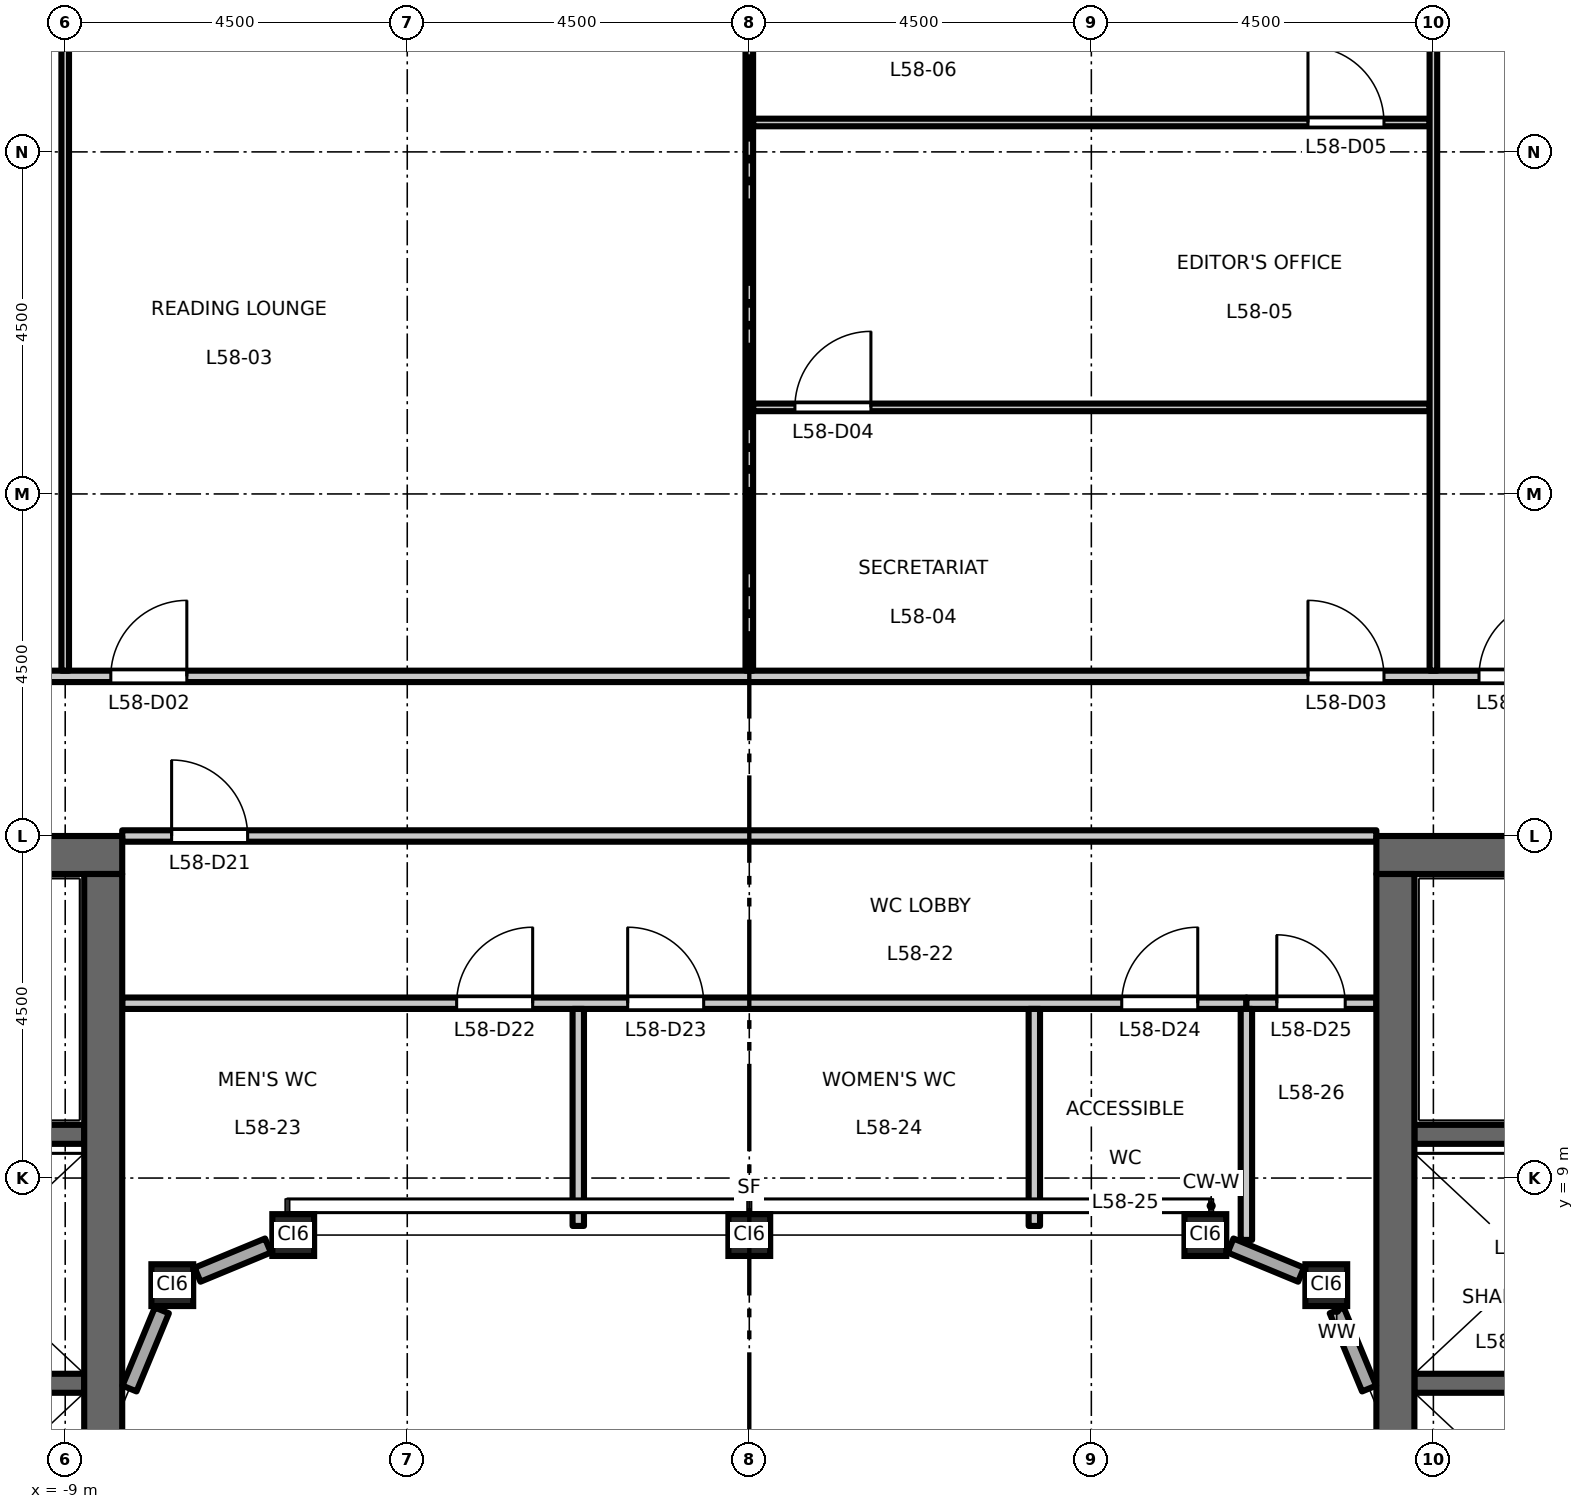
"""IFC4 building model, lengths in metres.
Left out: names, types, materials, properties, quantities, classifications, styles, units other than length and angle.
Written with IfcOpenShell. Run it as: python <this file> out.ifc"""

import sys

from ifc_helpers import new_model, si_unit, direction, frame, frame_2d, origin, origin_2d, place, context, subcontext, project, spatial, rectangle, hollow_rectangle, extrude, element, fill, save


model = new_model("IFC4")
c1 = context("Model", 3, precision=1e-05, world=origin(), true_north=direction((0.0, 1.0)))
c2 = subcontext(c1, "Body", "Model", "MODEL_VIEW")
j1 = project(units=[si_unit("LENGTHUNIT", "METRE"), si_unit("PLANEANGLEUNIT", "RADIAN")], contexts=[c1])
p1 = place(None, origin())
s1 = spatial("IfcSite", under=j1, at=p1, CompositionType="ELEMENT")
p2 = place(p1, origin())
s2 = spatial("IfcBuilding", under=s1, at=p2, CompositionType="ELEMENT")
p3 = place(p2, frame((0.0, 0.0, 269.2)))
s3 = spatial("IfcBuildingStorey", under=s2, at=p3, CompositionType="ELEMENT", Elevation=269.2)
for number, where, z_axis, x_axis in (
    (1, (-7.591, 7.591, 0.0), (0.0, 0.0, 1.0), (1.0, 0.0, 0.0)),
    (2, (-6.0, 8.25, 0.0), (0.0, 0.0, 1.0), (1.0, 0.0, 0.0)),
    (3, (0.0, 8.25, 0.0), (0.0, 0.0, 1.0), (1.0, 0.0, 0.0)),
    (4, (6.0, 8.25, 0.0), (0.0, 0.0, 1.0), (1.0, 0.0, 0.0)),
    (5, (7.591, 7.591, 0.0), (0.0, 0.0, 1.0), (1.0, 0.0, 0.0)),
):
    element("IfcColumn", number, at=place(p3, frame(where, z_axis=z_axis, x_axis=x_axis)), inside=s3, PredefinedType="COLUMN", context=c2, shape_type="SweptSolid", body=[
        extrude(hollow_rectangle(XDim=0.55, YDim=0.55, WallThickness=0.028, at=origin_2d()), origin(), (0.0, 0.0, 1.0), 4.5),
    ])
p4 = place(p3, frame((-8.75, 6.3, 0.0), z_axis=(0.0, 0.0, 1.0), x_axis=(-1.0, 0.0, 0.0)))
e6 = element("IfcWall", 6, at=p4, inside=s3, PredefinedType="SHEAR", context=c2, shape_type="SweptSolid", body=[
    extrude(rectangle(XDim=3.1, YDim=0.25, at=frame_2d((1.55, 0.0))), origin(), (0.0, 0.0, 1.0), 4.35),
])
p5 = place(p3, frame((-8.75, 9.575, 0.0), z_axis=(0.0, 0.0, 1.0), x_axis=(-1.0, 0.0, 0.0)))
e7 = element("IfcWall", 7, at=p5, inside=s3, PredefinedType="SHEAR", context=c2, shape_type="SweptSolid", body=[
    extrude(rectangle(XDim=8.0, YDim=0.25, at=frame_2d((4.0, 0.0))), origin(), (0.0, 0.0, 1.0), 4.35),
])
p6 = place(p5, frame((6.65, 0.0, 0.0)))
e8 = element("IfcOpeningElement", 8, at=p6, cuts=e7, PredefinedType="OPENING", context=c2, shape_type="SweptSolid", body=[
    extrude(rectangle(XDim=1.1, YDim=2.1, at=frame_2d((0.55, 1.05))), frame((0.0, 0.135, 0.0), z_axis=(0.0, -1.0, 0.0), x_axis=(1.0, 0.0, 0.0)), (0.0, 0.0, 1.0), 0.27),
])
p7 = place(p3, frame((-8.25, 13.25, 0.0), z_axis=(0.0, 0.0, 1.0), x_axis=(-1.0, 0.0, 0.0)))
e9 = element("IfcWall", 9, at=p7, inside=s3, PredefinedType="SHEAR", context=c2, shape_type="SweptSolid", body=[
    extrude(rectangle(XDim=13.5, YDim=0.5, at=frame_2d((6.75, 0.0))), origin(), (0.0, 0.0, 1.0), 4.35),
])
p8 = place(p3, frame((-8.5, -13.0, 0.0), z_axis=(0.0, 0.0, 1.0), x_axis=(0.0, 1.0, 0.0)))
e10 = element("IfcWall", 10, at=p8, inside=s3, PredefinedType="SHEAR", context=c2, shape_type="SweptSolid", body=[
    extrude(rectangle(XDim=26.0, YDim=0.5, at=frame_2d((13.0, 0.0))), origin(), (0.0, 0.0, 1.0), 4.35),
])
p9 = place(p3, frame((8.75, 6.3, 0.0), z_axis=(0.0, 0.0, 1.0), x_axis=(1.0, 0.0, 0.0)))
e11 = element("IfcWall", 11, at=p9, inside=s3, PredefinedType="SHEAR", context=c2, shape_type="SweptSolid", body=[
    extrude(rectangle(XDim=3.1, YDim=0.25, at=frame_2d((1.55, 0.0))), origin(), (0.0, 0.0, 1.0), 4.35),
])
p10 = place(p3, frame((8.75, 9.575, 0.0), z_axis=(0.0, 0.0, 1.0), x_axis=(1.0, 0.0, 0.0)))
e12 = element("IfcWall", 12, at=p10, inside=s3, PredefinedType="SHEAR", context=c2, shape_type="SweptSolid", body=[
    extrude(rectangle(XDim=8.0, YDim=0.25, at=frame_2d((4.0, 0.0))), origin(), (0.0, 0.0, 1.0), 4.35),
])
p11 = place(p10, frame((6.65, 0.0, 0.0)))
e13 = element("IfcOpeningElement", 13, at=p11, cuts=e12, PredefinedType="OPENING", context=c2, shape_type="SweptSolid", body=[
    extrude(rectangle(XDim=1.1, YDim=2.1, at=frame_2d((0.55, 1.05))), frame((0.0, 0.135, 0.0), z_axis=(0.0, -1.0, 0.0), x_axis=(1.0, 0.0, 0.0)), (0.0, 0.0, 1.0), 0.27),
])
p12 = place(p3, frame((8.25, 13.25, 0.0), z_axis=(0.0, 0.0, 1.0), x_axis=(1.0, 0.0, 0.0)))
e14 = element("IfcWall", 14, at=p12, inside=s3, PredefinedType="SHEAR", context=c2, shape_type="SweptSolid", body=[
    extrude(rectangle(XDim=13.5, YDim=0.5, at=frame_2d((6.75, 0.0))), origin(), (0.0, 0.0, 1.0), 4.35),
])
p13 = place(p3, frame((8.5, -13.0, 0.0), z_axis=(0.0, 0.0, 1.0), x_axis=(0.0, 1.0, 0.0)))
e15 = element("IfcWall", 15, at=p13, inside=s3, PredefinedType="SHEAR", context=c2, shape_type="SweptSolid", body=[
    extrude(rectangle(XDim=26.0, YDim=0.5, at=frame_2d((13.0, 0.0))), origin(), (0.0, 0.0, 1.0), 4.35),
])
p14 = place(p3, frame((8.154, 6.231, 0.0), z_axis=(0.0, 0.0, 1.0), x_axis=(-0.382635994082, 0.923899180665, 0.0)))
e16 = element("IfcWall", 16, at=p14, inside=s3, PredefinedType="STANDARD", context=c2, shape_type="SweptSolid", body=[
    extrude(rectangle(XDim=1.113, YDim=0.2, at=frame_2d((0.556, 0.0))), origin(), (0.0, 0.0, 1.0), 3.918),
])
for number, where, z_axis, x_axis in (
    (17, (7.259, 7.729, 0.0), (0.0, 0.0, 1.0), (-0.924, 0.383, 0.0)),
    (18, (-6.332, 8.113, 0.0), (0.0, 0.0, 1.0), (-0.924, -0.383, 0.0)),
):
    element("IfcWall", number, at=place(p3, frame(where, z_axis=z_axis, x_axis=x_axis)), inside=s3, PredefinedType="STANDARD", context=c2, shape_type="SweptSolid", body=[
        extrude(rectangle(XDim=1.003, YDim=0.2, at=frame_2d((0.502, 0.0))), origin(), (0.0, 0.0, 1.0), 3.918),
    ])
p15 = place(p3, frame((-7.729, 7.259, 0.0), z_axis=(0.0, 0.0, 1.0), x_axis=(-0.382635994082, -0.923899180665, 0.0)))
e19 = element("IfcWall", 19, at=p15, inside=s3, PredefinedType="STANDARD", context=c2, shape_type="SweptSolid", body=[
    extrude(rectangle(XDim=1.113, YDim=0.2, at=frame_2d((0.556, 0.0))), origin(), (0.0, 0.0, 1.0), 3.918),
])
p16 = place(p3, frame((-8.25, 11.3, 0.0), z_axis=(0.0, 0.0, 1.0), x_axis=(1.0, 0.0, 0.0)))
e20 = element("IfcWall", 20, at=p16, inside=s3, PredefinedType="PARTITIONING", context=c2, shape_type="SweptSolid", body=[
    extrude(rectangle(XDim=14.79, YDim=0.15, at=frame_2d((7.395, 0.0))), origin(), (0.0, 0.0, 1.0), 4.35),
])
p17 = place(p16, frame((4.4, 0.0, 0.0)))
e21 = element("IfcOpeningElement", 21, at=p17, cuts=e20, PredefinedType="OPENING", context=c2, shape_type="SweptSolid", body=[
    extrude(rectangle(XDim=1.0, YDim=2.1, at=frame_2d((0.5, 1.05))), frame((0.0, 0.085, 0.0), z_axis=(0.0, -1.0, 0.0), x_axis=(1.0, 0.0, 0.0)), (0.0, 0.0, 1.0), 0.17),
])
p18 = place(p16, frame((6.65, 0.0, 0.0)))
e22 = element("IfcOpeningElement", 22, at=p18, cuts=e20, PredefinedType="OPENING", context=c2, shape_type="SweptSolid", body=[
    extrude(rectangle(XDim=1.0, YDim=2.1, at=frame_2d((0.5, 1.05))), frame((0.0, 0.085, 0.0), z_axis=(0.0, -1.0, 0.0), x_axis=(1.0, 0.0, 0.0)), (0.0, 0.0, 1.0), 0.17),
])
p19 = place(p16, frame((13.15, 0.0, 0.0)))
e23 = element("IfcOpeningElement", 23, at=p19, cuts=e20, PredefinedType="OPENING", context=c2, shape_type="SweptSolid", body=[
    extrude(rectangle(XDim=1.0, YDim=2.1, at=frame_2d((0.5, 1.05))), frame((0.0, 0.085, 0.0), z_axis=(0.0, -1.0, 0.0), x_axis=(1.0, 0.0, 0.0)), (0.0, 0.0, 1.0), 0.17),
])
p20 = place(p3, frame((6.54, 11.3, 0.0), z_axis=(0.0, 0.0, 1.0), x_axis=(1.0, 0.0, 0.0)))
e24 = element("IfcWall", 24, at=p20, inside=s3, PredefinedType="PARTITIONING", context=c2, shape_type="SweptSolid", body=[
    extrude(rectangle(XDim=1.71, YDim=0.15, at=frame_2d((0.855, 0.0))), origin(), (0.0, 0.0, 1.0), 4.35),
])
p21 = place(p20, frame((0.4, 0.0, 0.0)))
e25 = element("IfcOpeningElement", 25, at=p21, cuts=e24, PredefinedType="OPENING", context=c2, shape_type="SweptSolid", body=[
    extrude(rectangle(XDim=0.9, YDim=2.1, at=frame_2d((0.45, 1.05))), frame((0.0, 0.085, 0.0), z_axis=(0.0, -1.0, 0.0), x_axis=(1.0, 0.0, 0.0)), (0.0, 0.0, 1.0), 0.17),
])
p22 = place(p3, frame((-8.25, 13.5, 0.0), z_axis=(0.0, 0.0, 1.0), x_axis=(1.0, 0.0, 0.0)))
e26 = element("IfcWall", 26, at=p22, inside=s3, PredefinedType="PARTITIONING", context=c2, shape_type="SweptSolid", body=[
    extrude(rectangle(XDim=16.5, YDim=0.15, at=frame_2d((8.25, 0.0))), origin(), (0.0, 0.0, 1.0), 4.35),
])
p23 = place(p22, frame((0.65, 0.0, 0.0)))
e27 = element("IfcOpeningElement", 27, at=p23, cuts=e26, PredefinedType="OPENING", context=c2, shape_type="SweptSolid", body=[
    extrude(rectangle(XDim=1.0, YDim=2.1, at=frame_2d((0.5, 1.05))), frame((0.0, 0.085, 0.0), z_axis=(0.0, -1.0, 0.0), x_axis=(1.0, 0.0, 0.0)), (0.0, 0.0, 1.0), 0.17),
])
p24 = place(p3, frame((-26.01, 15.6, 0.0), z_axis=(0.0, 0.0, 1.0), x_axis=(1.0, 0.0, 0.0)))
e28 = element("IfcWall", 28, at=p24, inside=s3, PredefinedType="PARTITIONING", context=c2, shape_type="SweptSolid", body=[
    extrude(rectangle(XDim=52.02, YDim=0.15, at=frame_2d((26.01, 0.0))), origin(), (0.0, 0.0, 1.0), 4.35),
])
p25 = place(p24, frame((15.36, 0.0, 0.0)))
e29 = element("IfcOpeningElement", 29, at=p25, cuts=e28, PredefinedType="OPENING", context=c2, shape_type="SweptSolid", body=[
    extrude(rectangle(XDim=1.0, YDim=2.1, at=frame_2d((0.5, 1.05))), frame((0.0, 0.085, 0.0), z_axis=(0.0, -1.0, 0.0), x_axis=(1.0, 0.0, 0.0)), (0.0, 0.0, 1.0), 0.17),
])
p26 = place(p24, frame((17.61, 0.0, 0.0)))
e30 = element("IfcOpeningElement", 30, at=p26, cuts=e28, PredefinedType="OPENING", context=c2, shape_type="SweptSolid", body=[
    extrude(rectangle(XDim=1.0, YDim=2.1, at=frame_2d((0.5, 1.05))), frame((0.0, 0.085, 0.0), z_axis=(0.0, -1.0, 0.0), x_axis=(1.0, 0.0, 0.0)), (0.0, 0.0, 1.0), 0.17),
])
p27 = place(p24, frame((33.36, 0.0, 0.0)))
e31 = element("IfcOpeningElement", 31, at=p27, cuts=e28, PredefinedType="OPENING", context=c2, shape_type="SweptSolid", body=[
    extrude(rectangle(XDim=1.0, YDim=2.1, at=frame_2d((0.5, 1.05))), frame((0.0, 0.085, 0.0), z_axis=(0.0, -1.0, 0.0), x_axis=(1.0, 0.0, 0.0)), (0.0, 0.0, 1.0), 0.17),
])
p28 = place(p24, frame((35.61, 0.0, 0.0)))
e32 = element("IfcOpeningElement", 32, at=p28, cuts=e28, PredefinedType="OPENING", context=c2, shape_type="SweptSolid", body=[
    extrude(rectangle(XDim=1.0, YDim=2.1, at=frame_2d((0.5, 1.05))), frame((0.0, 0.085, 0.0), z_axis=(0.0, -1.0, 0.0), x_axis=(1.0, 0.0, 0.0)), (0.0, 0.0, 1.0), 0.17),
])
p29 = place(p24, frame((0.61, 0.0, 0.0)))
e33 = element("IfcOpeningElement", 33, at=p29, cuts=e28, PredefinedType="OPENING", context=c2, shape_type="SweptSolid", body=[
    extrude(rectangle(XDim=1.0, YDim=2.1, at=frame_2d((0.5, 1.05))), frame((0.0, 0.085, 0.0), z_axis=(0.0, -1.0, 0.0), x_axis=(1.0, 0.0, 0.0)), (0.0, 0.0, 1.0), 0.17),
])
p30 = place(p24, frame((44.62, 0.0, 0.0)))
e34 = element("IfcOpeningElement", 34, at=p30, cuts=e28, PredefinedType="OPENING", context=c2, shape_type="SweptSolid", body=[
    extrude(rectangle(XDim=1.0, YDim=2.1, at=frame_2d((0.5, 1.05))), frame((0.0, 0.085, 0.0), z_axis=(0.0, -1.0, 0.0), x_axis=(1.0, 0.0, 0.0)), (0.0, 0.0, 1.0), 0.17),
])
p31 = place(p3, frame((0.05, 19.139, 0.0), z_axis=(0.0, 0.0, 1.0), x_axis=(1.0, 0.0, 0.0)))
e35 = element("IfcWall", 35, at=p31, inside=s3, PredefinedType="PARTITIONING", context=c2, shape_type="SweptSolid", body=[
    extrude(rectangle(XDim=8.9, YDim=0.1, at=frame_2d((4.45, 0.0))), origin(), (0.0, 0.0, 1.0), 4.35),
])
p32 = place(p31, frame((0.55, 0.0, 0.0)))
e36 = element("IfcOpeningElement", 36, at=p32, cuts=e35, PredefinedType="OPENING", context=c2, shape_type="SweptSolid", body=[
    extrude(rectangle(XDim=1.0, YDim=2.1, at=frame_2d((0.5, 1.05))), frame((0.0, 0.06, 0.0), z_axis=(0.0, -1.0, 0.0), x_axis=(1.0, 0.0, 0.0)), (0.0, 0.0, 1.0), 0.12),
])
p33 = place(p3, frame((0.05, 22.887, 0.0), z_axis=(0.0, 0.0, 1.0), x_axis=(1.0, 0.0, 0.0)))
e37 = element("IfcWall", 37, at=p33, inside=s3, PredefinedType="PARTITIONING", context=c2, shape_type="SweptSolid", body=[
    extrude(rectangle(XDim=8.9, YDim=0.1, at=frame_2d((4.45, 0.0))), origin(), (0.0, 0.0, 1.0), 4.35),
])
p34 = place(p33, frame((7.3, 0.0, 0.0)))
e38 = element("IfcOpeningElement", 38, at=p34, cuts=e37, PredefinedType="OPENING", context=c2, shape_type="SweptSolid", body=[
    extrude(rectangle(XDim=1.0, YDim=2.1, at=frame_2d((0.5, 1.05))), frame((0.0, 0.06, 0.0), z_axis=(0.0, -1.0, 0.0), x_axis=(1.0, 0.0, 0.0)), (0.0, 0.0, 1.0), 0.12),
])
p35 = place(p3, frame((-9.0, 15.675, 0.0), z_axis=(0.0, 0.0, 1.0), x_axis=(0.0, 1.0, 0.0)))
e39 = element("IfcWall", 39, at=p35, inside=s3, PredefinedType="PARTITIONING", context=c2, shape_type="SweptSolid", body=[
    extrude(rectangle(XDim=10.335, YDim=0.1, at=frame_2d((5.167, 0.0))), origin(), (0.0, 0.0, 1.0), 3.65),
])
p36 = place(p3, frame((-2.25, 8.37, 0.0), z_axis=(0.0, 0.0, 1.0), x_axis=(0.0, 1.0, 0.0)))
e40 = element("IfcWall", 40, at=p36, inside=s3, PredefinedType="PARTITIONING", context=c2, shape_type="SweptSolid", body=[
    extrude(rectangle(XDim=2.855, YDim=0.15, at=frame_2d((1.427, 0.0))), origin(), (0.0, 0.0, 1.0), 4.35),
])
p37 = place(p3, frame((0.0, 15.675, 0.0), z_axis=(0.0, 0.0, 1.0), x_axis=(0.0, 1.0, 0.0)))
e41 = element("IfcWall", 41, at=p37, inside=s3, PredefinedType="PARTITIONING", context=c2, shape_type="SweptSolid", body=[
    extrude(rectangle(XDim=10.335, YDim=0.1, at=frame_2d((5.167, 0.0))), origin(), (0.0, 0.0, 1.0), 3.55),
])
p38 = place(p3, frame((3.75, 8.37, 0.0), z_axis=(0.0, 0.0, 1.0), x_axis=(0.0, 1.0, 0.0)))
e42 = element("IfcWall", 42, at=p38, inside=s3, PredefinedType="PARTITIONING", context=c2, shape_type="SweptSolid", body=[
    extrude(rectangle(XDim=2.855, YDim=0.15, at=frame_2d((1.427, 0.0))), origin(), (0.0, 0.0, 1.0), 4.35),
])
p39 = place(p3, frame((6.54, 8.186, 0.0), z_axis=(0.0, 0.0, 1.0), x_axis=(0.0, 1.0, 0.0)))
e43 = element("IfcWall", 43, at=p39, inside=s3, PredefinedType="PARTITIONING", context=c2, shape_type="SweptSolid", body=[
    extrude(rectangle(XDim=3.039, YDim=0.15, at=frame_2d((1.52, 0.0))), origin(), (0.0, 0.0, 1.0), 4.35),
])
p40 = place(p3, frame((9.0, 15.675, 0.0), z_axis=(0.0, 0.0, 1.0), x_axis=(0.0, 1.0, 0.0)))
e44 = element("IfcWall", 44, at=p40, inside=s3, PredefinedType="PARTITIONING", context=c2, shape_type="SweptSolid", body=[
    extrude(rectangle(XDim=10.335, YDim=0.1, at=frame_2d((5.167, 0.0))), origin(), (0.0, 0.0, 1.0), 3.65),
])
p41 = place(p26, origin())
e45 = element("IfcDoor", 45, at=p41, inside=s3, OperationType="SINGLE_SWING_RIGHT", PredefinedType="DOOR", context=c2, shape_type="SweptSolid", body=[
    extrude(rectangle(XDim=1.0, YDim=2.1, at=frame_2d((0.5, 1.05))), frame((0.0, 0.025, 0.0), z_axis=(0.0, -1.0, 0.0), x_axis=(1.0, 0.0, 0.0)), (0.0, 0.0, 1.0), 0.05),
])
fill(e30, e45)
p42 = place(p27, origin())
e46 = element("IfcDoor", 46, at=p42, inside=s3, OperationType="SINGLE_SWING_LEFT", PredefinedType="DOOR", context=c2, shape_type="SweptSolid", body=[
    extrude(rectangle(XDim=1.0, YDim=2.1, at=frame_2d((0.5, 1.05))), frame((0.0, 0.025, 0.0), z_axis=(0.0, -1.0, 0.0), x_axis=(1.0, 0.0, 0.0)), (0.0, 0.0, 1.0), 0.05),
])
fill(e31, e46)
p43 = place(p32, origin())
e47 = element("IfcDoor", 47, at=p43, inside=s3, OperationType="SINGLE_SWING_RIGHT", PredefinedType="DOOR", context=c2, shape_type="SweptSolid", body=[
    extrude(rectangle(XDim=1.0, YDim=2.1, at=frame_2d((0.5, 1.05))), frame((0.0, 0.025, 0.0), z_axis=(0.0, -1.0, 0.0), x_axis=(1.0, 0.0, 0.0)), (0.0, 0.0, 1.0), 0.05),
])
fill(e36, e47)
p44 = place(p34, origin())
e48 = element("IfcDoor", 48, at=p44, inside=s3, OperationType="SINGLE_SWING_LEFT", PredefinedType="DOOR", context=c2, shape_type="SweptSolid", body=[
    extrude(rectangle(XDim=1.0, YDim=2.1, at=frame_2d((0.5, 1.05))), frame((0.0, 0.025, 0.0), z_axis=(0.0, -1.0, 0.0), x_axis=(1.0, 0.0, 0.0)), (0.0, 0.0, 1.0), 0.05),
])
fill(e38, e48)
p45 = place(p28, origin())
e49 = element("IfcDoor", 49, at=p45, inside=s3, OperationType="SINGLE_SWING_RIGHT", PredefinedType="DOOR", context=c2, shape_type="SweptSolid", body=[
    extrude(rectangle(XDim=1.0, YDim=2.1, at=frame_2d((0.5, 1.05))), frame((0.0, 0.025, 0.0), z_axis=(0.0, -1.0, 0.0), x_axis=(1.0, 0.0, 0.0)), (0.0, 0.0, 1.0), 0.05),
])
fill(e32, e49)
p46 = place(p23, origin())
e50 = element("IfcDoor", 50, at=p46, inside=s3, OperationType="SINGLE_SWING_LEFT", PredefinedType="DOOR", context=c2, shape_type="SweptSolid", body=[
    extrude(rectangle(XDim=1.0, YDim=2.1, at=frame_2d((0.5, 1.05))), frame((0.0, 0.025, 0.0), z_axis=(0.0, -1.0, 0.0), x_axis=(1.0, 0.0, 0.0)), (0.0, 0.0, 1.0), 0.05),
])
fill(e27, e50)
p47 = place(p17, origin())
e51 = element("IfcDoor", 51, at=p47, inside=s3, OperationType="SINGLE_SWING_RIGHT", PredefinedType="DOOR", context=c2, shape_type="SweptSolid", body=[
    extrude(rectangle(XDim=1.0, YDim=2.1, at=frame_2d((0.5, 1.05))), frame((0.0, 0.025, 0.0), z_axis=(0.0, -1.0, 0.0), x_axis=(1.0, 0.0, 0.0)), (0.0, 0.0, 1.0), 0.05),
])
fill(e21, e51)
p48 = place(p18, origin())
e52 = element("IfcDoor", 52, at=p48, inside=s3, OperationType="SINGLE_SWING_LEFT", PredefinedType="DOOR", context=c2, shape_type="SweptSolid", body=[
    extrude(rectangle(XDim=1.0, YDim=2.1, at=frame_2d((0.5, 1.05))), frame((0.0, 0.025, 0.0), z_axis=(0.0, -1.0, 0.0), x_axis=(1.0, 0.0, 0.0)), (0.0, 0.0, 1.0), 0.05),
])
fill(e22, e52)
p49 = place(p19, origin())
e53 = element("IfcDoor", 53, at=p49, inside=s3, OperationType="SINGLE_SWING_RIGHT", PredefinedType="DOOR", context=c2, shape_type="SweptSolid", body=[
    extrude(rectangle(XDim=1.0, YDim=2.1, at=frame_2d((0.5, 1.05))), frame((0.0, 0.025, 0.0), z_axis=(0.0, -1.0, 0.0), x_axis=(1.0, 0.0, 0.0)), (0.0, 0.0, 1.0), 0.05),
])
fill(e23, e53)
p50 = place(p21, origin())
e54 = element("IfcDoor", 54, at=p50, inside=s3, OperationType="SINGLE_SWING_LEFT", PredefinedType="DOOR", context=c2, shape_type="SweptSolid", body=[
    extrude(rectangle(XDim=0.9, YDim=2.1, at=frame_2d((0.45, 1.05))), frame((0.0, 0.025, 0.0), z_axis=(0.0, -1.0, 0.0), x_axis=(1.0, 0.0, 0.0)), (0.0, 0.0, 1.0), 0.05),
])
fill(e25, e54)
save(model, sys.argv[1])
